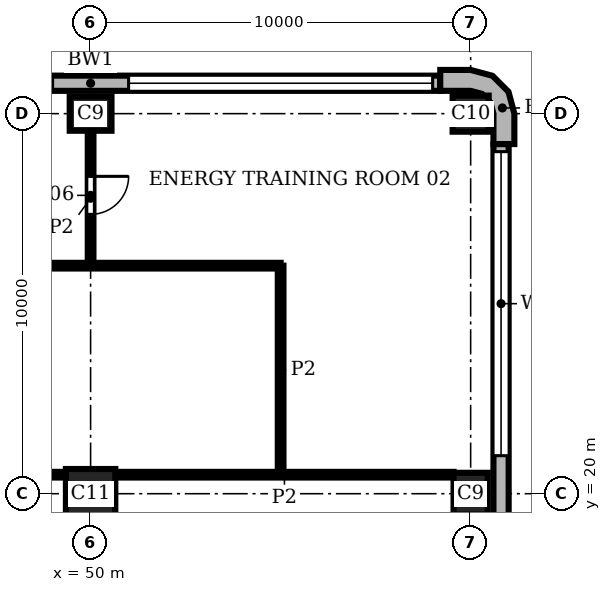
"""IFC4 building model, lengths in metres.
Left out: names, types, materials, properties, quantities, classifications, styles, units other than length and angle.
Written with IfcOpenShell. Run it as: python <this file> out.ifc"""

import sys

from ifc_helpers import new_model, si_unit, direction, frame, frame_2d, origin, origin_2d, place, context, subcontext, project, spatial, polyline, rectangle, outline, extrude, element, fill, save


model = new_model("IFC4")
c1 = context("Model", 3, precision=1e-05, world=origin(), true_north=direction((0.0, 1.0)))
c2 = subcontext(c1, "Body", "Model", "MODEL_VIEW")
j1 = project(units=[si_unit("LENGTHUNIT", "METRE"), si_unit("PLANEANGLEUNIT", "RADIAN")], contexts=[c1])
p1 = place(None, origin())
s1 = spatial("IfcSite", under=j1, at=p1, CompositionType="ELEMENT")
p2 = place(p1, origin())
s2 = spatial("IfcBuilding", under=s1, at=p2, CompositionType="ELEMENT")
p3 = place(p2, frame((0.0, 0.0, 213.6)))
s3 = spatial("IfcBuildingStorey", under=s2, at=p3, CompositionType="ELEMENT", Elevation=213.6)
p4 = place(p3, frame((60.0, 20.0, 0.0), z_axis=(0.0, 0.0, 1.0), x_axis=(0.0, 1.0, 0.0)))
e1 = element("IfcColumn", 1, at=p4, inside=s3, PredefinedType="COLUMN", context=c2, shape_type="SweptSolid", body=[
    extrude(rectangle(XDim=1.1, YDim=0.9, at=origin_2d()), origin(), (0.0, 0.0, 1.0), 3.9),
])
p5 = place(p3, frame((60.0, 30.0, 0.0), z_axis=(0.0, 0.0, 1.0), x_axis=(1.0, 0.0, 0.0)))
e2 = element("IfcColumn", 2, at=p5, inside=s3, PredefinedType="COLUMN", context=c2, shape_type="SweptSolid", body=[
    extrude(rectangle(XDim=0.95, YDim=0.95, at=origin_2d()), origin(), (0.0, 0.0, 1.0), 3.9),
])
p6 = place(p3, frame((50.0, 30.0, 0.0), z_axis=(0.0, 0.0, 1.0), x_axis=(1.0, 0.0, 0.0)))
e3 = element("IfcColumn", 3, at=p6, inside=s3, PredefinedType="COLUMN", context=c2, shape_type="SweptSolid", body=[
    extrude(rectangle(XDim=1.1, YDim=0.9, at=origin_2d()), origin(), (0.0, 0.0, 1.0), 3.9),
])
p7 = place(p3, frame((50.0, 20.0, 0.0), z_axis=(0.0, 0.0, 1.0), x_axis=(1.0, 0.0, 0.0)))
e4 = element("IfcColumn", 4, at=p7, inside=s3, PredefinedType="COLUMN", context=c2, shape_type="SweptSolid", body=[
    extrude(rectangle(XDim=1.3, YDim=1.3, at=origin_2d()), origin(), (0.0, 0.0, 1.0), 3.9),
])
p8 = place(p3, origin())
e5 = element("IfcWall", 5, at=p8, inside=s3, PredefinedType="SOLIDWALL", context=c2, shape_type="SweptSolid", body=[
    extrude(outline(polyline([(61.0, 29.2), (61.15, 29.2), (61.15, 30.0), (60.996, 30.575), (60.575, 30.996), (60.0, 31.15), (59.2, 31.15), (59.2, 31.0), (59.2, 30.6), (60.0, 30.6), (60.3, 30.52), (60.52, 30.3), (60.6, 30.0), (60.6, 29.2), (61.0, 29.2)])), origin(), (0.0, 0.0, 1.0), 3.9),
])
p9 = place(p3, frame((60.8, 0.8, 0.0), z_axis=(0.0, 0.0, 1.0), x_axis=(0.0, 1.0, 0.0)))
e6 = element("IfcWall", 6, at=p9, inside=s3, PredefinedType="SOLIDWALL", context=c2, shape_type="SweptSolid", body=[
    extrude(rectangle(XDim=28.4, YDim=0.4, at=frame_2d((14.2, 0.0))), origin(), (0.0, 0.0, 1.0), 3.9),
])
p10 = place(p9, frame((0.2, 0.0, 0.9)))
e7 = element("IfcOpeningElement", 7, at=p10, cuts=e6, PredefinedType="OPENING", context=c2, shape_type="SweptSolid", body=[
    extrude(rectangle(XDim=8.0, YDim=2.35, at=frame_2d((4.0, 1.175))), frame((0.0, 0.21, 0.0), z_axis=(0.0, -1.0, 0.0), x_axis=(1.0, 0.0, 0.0)), (0.0, 0.0, 1.0), 0.42),
])
p11 = place(p9, frame((10.2, 0.0, 0.9)))
e8 = element("IfcOpeningElement", 8, at=p11, cuts=e6, PredefinedType="OPENING", context=c2, shape_type="SweptSolid", body=[
    extrude(rectangle(XDim=8.0, YDim=2.35, at=frame_2d((4.0, 1.175))), frame((0.0, 0.21, 0.0), z_axis=(0.0, -1.0, 0.0), x_axis=(1.0, 0.0, 0.0)), (0.0, 0.0, 1.0), 0.42),
])
p12 = place(p9, frame((20.2, 0.0, 0.9)))
e9 = element("IfcOpeningElement", 9, at=p12, cuts=e6, PredefinedType="OPENING", context=c2, shape_type="SweptSolid", body=[
    extrude(rectangle(XDim=8.0, YDim=2.35, at=frame_2d((4.0, 1.175))), frame((0.0, 0.21, 0.0), z_axis=(0.0, -1.0, 0.0), x_axis=(1.0, 0.0, 0.0)), (0.0, 0.0, 1.0), 0.42),
])
p13 = place(p3, frame((59.2, 30.8, 0.0), z_axis=(0.0, 0.0, 1.0), x_axis=(-1.0, 0.0, 0.0)))
e10 = element("IfcWall", 10, at=p13, inside=s3, PredefinedType="SOLIDWALL", context=c2, shape_type="SweptSolid", body=[
    extrude(rectangle(XDim=18.4, YDim=0.4, at=frame_2d((9.2, 0.0))), origin(), (0.0, 0.0, 1.0), 3.9),
])
p14 = place(p13, frame((0.2, 0.0, 0.9)))
e11 = element("IfcOpeningElement", 11, at=p14, cuts=e10, PredefinedType="OPENING", context=c2, shape_type="SweptSolid", body=[
    extrude(rectangle(XDim=8.0, YDim=2.35, at=frame_2d((4.0, 1.175))), frame((0.0, 0.21, 0.0), z_axis=(0.0, -1.0, 0.0), x_axis=(1.0, 0.0, 0.0)), (0.0, 0.0, 1.0), 0.42),
])
p15 = place(p13, frame((10.2, 0.0, 0.9)))
e12 = element("IfcOpeningElement", 12, at=p15, cuts=e10, PredefinedType="OPENING", context=c2, shape_type="SweptSolid", body=[
    extrude(rectangle(XDim=8.0, YDim=2.35, at=frame_2d((4.0, 1.175))), frame((0.0, 0.21, 0.0), z_axis=(0.0, -1.0, 0.0), x_axis=(1.0, 0.0, 0.0)), (0.0, 0.0, 1.0), 0.42),
])
p16 = place(p3, frame((50.0, 26.0, 0.0), z_axis=(0.0, 0.0, 1.0), x_axis=(0.0, 1.0, 0.0)))
e13 = element("IfcWall", 13, at=p16, inside=s3, PredefinedType="PARTITIONING", context=c2, shape_type="SweptSolid", body=[
    extrude(rectangle(XDim=3.55, YDim=0.15, at=frame_2d((1.775, 0.0))), origin(), (0.0, 0.0, 1.0), 3.58),
])
p17 = place(p16, frame((1.35, 0.0, 0.0)))
e14 = element("IfcOpeningElement", 14, at=p17, cuts=e13, PredefinedType="OPENING", context=c2, shape_type="SweptSolid", body=[
    extrude(rectangle(XDim=1.0, YDim=2.1, at=frame_2d((0.5, 1.05))), frame((0.0, 0.085, 0.0), z_axis=(0.0, -1.0, 0.0), x_axis=(1.0, 0.0, 0.0)), (0.0, 0.0, 1.0), 0.17),
])
p18 = place(p3, frame((55.0, 20.5, 0.0), z_axis=(0.0, 0.0, 1.0), x_axis=(0.0, 1.0, 0.0)))
e15 = element("IfcWall", 15, at=p18, inside=s3, PredefinedType="PARTITIONING", context=c2, shape_type="SweptSolid", body=[
    extrude(rectangle(XDim=5.5, YDim=0.15, at=frame_2d((2.75, 0.0))), origin(), (0.0, 0.0, 1.0), 3.58),
])
p19 = place(p3, frame((40.65, 20.5, 0.0), z_axis=(0.0, 0.0, 1.0), x_axis=(1.0, 0.0, 0.0)))
e16 = element("IfcWall", 16, at=p19, inside=s3, PredefinedType="PARTITIONING", context=c2, shape_type="SweptSolid", body=[
    extrude(rectangle(XDim=8.7, YDim=0.15, at=frame_2d((4.35, 0.0))), origin(), (0.0, 0.0, 1.0), 3.58),
])
p20 = place(p3, frame((50.65, 20.5, 0.0), z_axis=(0.0, 0.0, 1.0), x_axis=(1.0, 0.0, 0.0)))
e17 = element("IfcWall", 17, at=p20, inside=s3, PredefinedType="PARTITIONING", context=c2, shape_type="SweptSolid", body=[
    extrude(rectangle(XDim=8.9, YDim=0.15, at=frame_2d((4.45, 0.0))), origin(), (0.0, 0.0, 1.0), 3.58),
])
p21 = place(p3, frame((33.2, 26.0, 0.0), z_axis=(0.0, 0.0, 1.0), x_axis=(1.0, 0.0, 0.0)))
e18 = element("IfcWall", 18, at=p21, inside=s3, PredefinedType="PARTITIONING", context=c2, shape_type="SweptSolid", body=[
    extrude(rectangle(XDim=21.8, YDim=0.15, at=frame_2d((10.9, 0.0))), origin(), (0.0, 0.0, 1.0), 3.58),
])
p22 = place(p21, frame((3.1, 0.0, 0.0)))
e19 = element("IfcOpeningElement", 19, at=p22, cuts=e18, PredefinedType="OPENING", context=c2, shape_type="SweptSolid", body=[
    extrude(rectangle(XDim=1.0, YDim=2.1, at=frame_2d((0.5, 1.05))), frame((0.0, 0.085, 0.0), z_axis=(0.0, -1.0, 0.0), x_axis=(1.0, 0.0, 0.0)), (0.0, 0.0, 1.0), 0.17),
])
p23 = place(p21, frame((12.4, 0.0, 0.0)))
e20 = element("IfcOpeningElement", 20, at=p23, cuts=e18, PredefinedType="OPENING", context=c2, shape_type="SweptSolid", body=[
    extrude(rectangle(XDim=1.0, YDim=2.1, at=frame_2d((0.5, 1.05))), frame((0.0, 0.085, 0.0), z_axis=(0.0, -1.0, 0.0), x_axis=(1.0, 0.0, 0.0)), (0.0, 0.0, 1.0), 0.17),
])
p24 = place(p12, origin())
e21 = element("IfcWindow", 21, at=p24, inside=s3, PartitioningType="SINGLE_PANEL", PredefinedType="WINDOW", context=c2, shape_type="SweptSolid", body=[
    extrude(rectangle(XDim=8.0, YDim=2.35, at=frame_2d((4.0, 1.175))), frame((0.0, 0.16, 0.0), z_axis=(0.0, -1.0, 0.0), x_axis=(1.0, 0.0, 0.0)), (0.0, 0.0, 1.0), 0.06),
])
fill(e9, e21)
p25 = place(p14, origin())
e22 = element("IfcWindow", 22, at=p25, inside=s3, PartitioningType="SINGLE_PANEL", PredefinedType="WINDOW", context=c2, shape_type="SweptSolid", body=[
    extrude(rectangle(XDim=8.0, YDim=2.35, at=frame_2d((4.0, 1.175))), frame((0.0, 0.16, 0.0), z_axis=(0.0, -1.0, 0.0), x_axis=(1.0, 0.0, 0.0)), (0.0, 0.0, 1.0), 0.06),
])
fill(e11, e22)
p26 = place(p17, frame((1.0, 0.0, 0.0), z_axis=(0.0, 0.0, 1.0), x_axis=(-1.0, 0.0, 0.0)))
e23 = element("IfcDoor", 23, at=p26, inside=s3, OperationType="SINGLE_SWING_LEFT", PredefinedType="DOOR", context=c2, shape_type="SweptSolid", body=[
    extrude(rectangle(XDim=1.0, YDim=2.1, at=frame_2d((0.5, 1.05))), frame((0.0, 0.025, 0.0), z_axis=(0.0, -1.0, 0.0), x_axis=(1.0, 0.0, 0.0)), (0.0, 0.0, 1.0), 0.05),
])
fill(e14, e23)
save(model, sys.argv[1])
